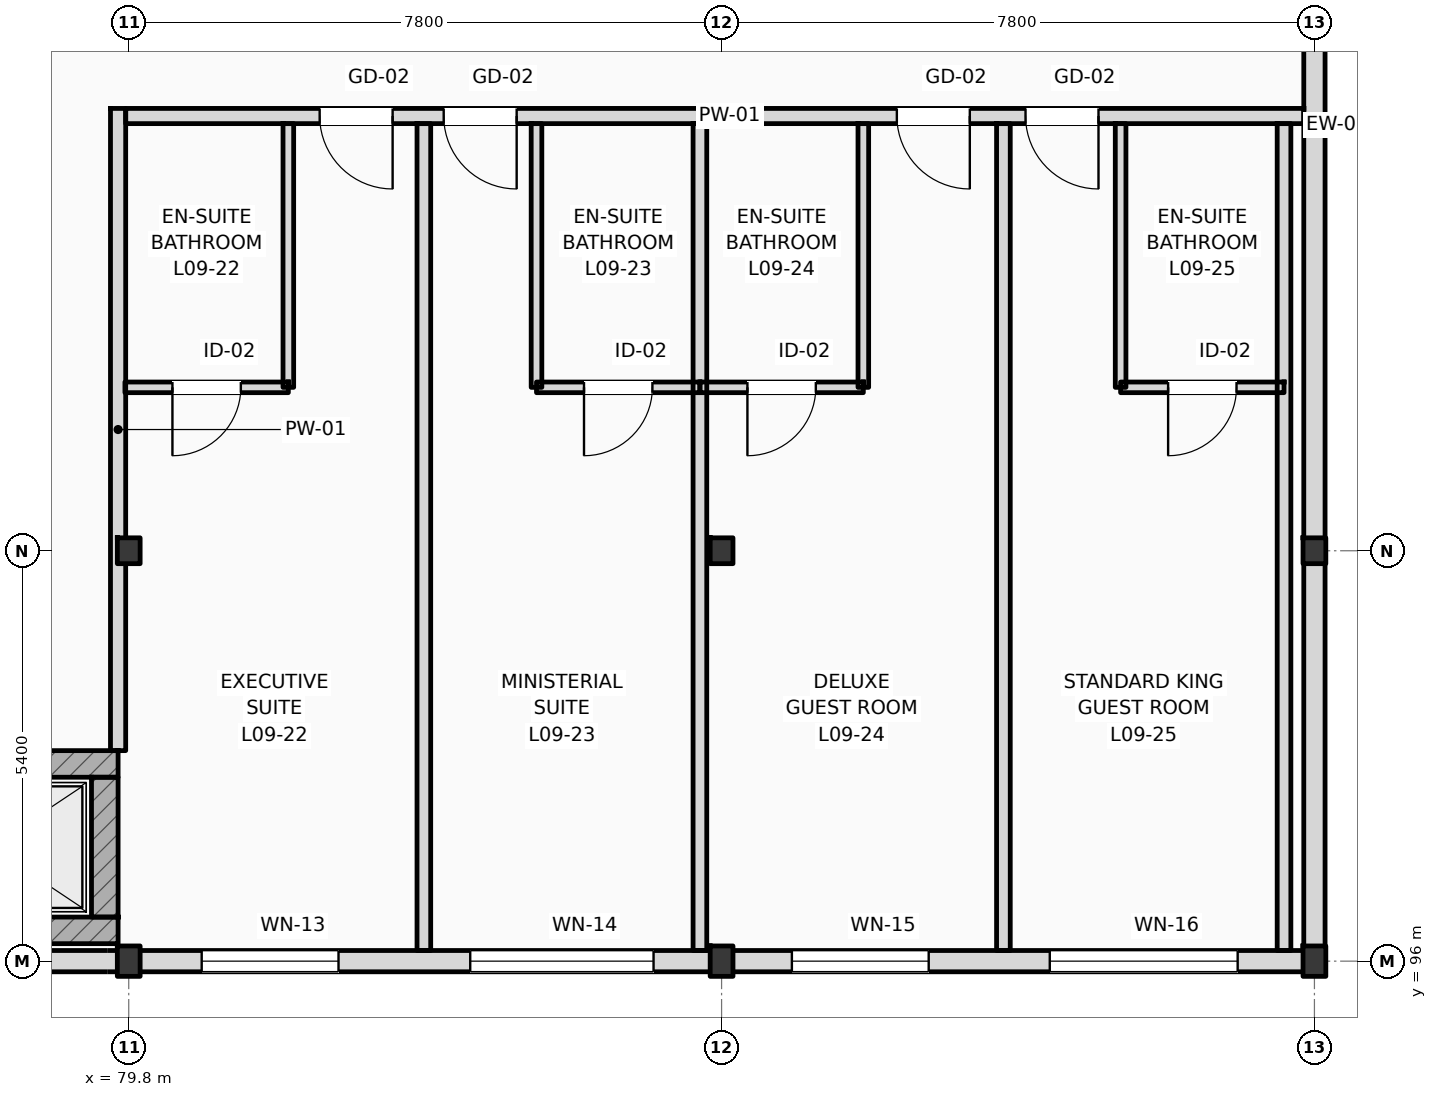
"""IFC4 building model, lengths in metres.
Left out: names, types, materials, properties, quantities, classifications, styles, units other than length and angle.
Written with IfcOpenShell. Run it as: python <this file> out.ifc"""

import sys

from ifc_helpers import new_model, si_unit, direction, frame, frame_2d, origin, origin_2d, place, context, subcontext, project, spatial, rectangle, i_section, extrude, element, fill, save


model = new_model("IFC4")
c1 = context("Model", 3, precision=1e-05, world=origin(), true_north=direction((0.0, 1.0)))
c2 = subcontext(c1, "Body", "Model", "MODEL_VIEW")
j1 = project(units=[si_unit("LENGTHUNIT", "METRE"), si_unit("PLANEANGLEUNIT", "RADIAN")], contexts=[c1])
p1 = place(None, origin())
s1 = spatial("IfcSite", under=j1, at=p1, CompositionType="ELEMENT")
p2 = place(p1, origin())
s2 = spatial("IfcBuilding", under=s1, at=p2, CompositionType="ELEMENT")
p3 = place(p2, frame((0.0, 0.0, 39.0)))
s3 = spatial("IfcBuildingStorey", under=s2, at=p3, CompositionType="ELEMENT", Elevation=39.0)
p4 = place(p3, frame((79.8, 96.0, 0.0), z_axis=(0.0, 0.0, 1.0), x_axis=(1.0, 0.0, 0.0)))
e1 = element("IfcColumn", 1, at=p4, inside=s3, PredefinedType="COLUMN", context=c2, shape_type="SweptSolid", body=[
    extrude(i_section(OverallWidth=0.3, OverallDepth=0.4, WebThickness=0.013, FlangeThickness=0.024, FilletRadius=0.027, at=origin_2d()), origin(), (0.0, 0.0, 1.0), 3.6),
])
p5 = place(p3, frame((79.8, 101.4, 0.0), z_axis=(0.0, 0.0, 1.0), x_axis=(1.0, 0.0, 0.0)))
e2 = element("IfcColumn", 2, at=p5, inside=s3, PredefinedType="COLUMN", context=c2, shape_type="SweptSolid", body=[
    extrude(i_section(OverallWidth=0.3, OverallDepth=0.34, WebThickness=0.012, FlangeThickness=0.021, FilletRadius=0.027, at=origin_2d()), origin(), (0.0, 0.0, 1.0), 3.6),
])
p6 = place(p3, frame((87.6, 96.0, 0.0), z_axis=(0.0, 0.0, 1.0), x_axis=(1.0, 0.0, 0.0)))
e3 = element("IfcColumn", 3, at=p6, inside=s3, PredefinedType="COLUMN", context=c2, shape_type="SweptSolid", body=[
    extrude(i_section(OverallWidth=0.3, OverallDepth=0.4, WebThickness=0.013, FlangeThickness=0.024, FilletRadius=0.027, at=origin_2d()), origin(), (0.0, 0.0, 1.0), 3.6),
])
p7 = place(p3, frame((87.6, 101.4, 0.0), z_axis=(0.0, 0.0, 1.0), x_axis=(1.0, 0.0, 0.0)))
e4 = element("IfcColumn", 4, at=p7, inside=s3, PredefinedType="COLUMN", context=c2, shape_type="SweptSolid", body=[
    extrude(i_section(OverallWidth=0.3, OverallDepth=0.34, WebThickness=0.012, FlangeThickness=0.021, FilletRadius=0.027, at=origin_2d()), origin(), (0.0, 0.0, 1.0), 3.6),
])
p8 = place(p3, frame((95.4, 96.0, 0.0), z_axis=(0.0, 0.0, 1.0), x_axis=(1.0, 0.0, 0.0)))
e5 = element("IfcColumn", 5, at=p8, inside=s3, PredefinedType="COLUMN", context=c2, shape_type="SweptSolid", body=[
    extrude(i_section(OverallWidth=0.3, OverallDepth=0.4, WebThickness=0.013, FlangeThickness=0.024, FilletRadius=0.027, at=origin_2d()), origin(), (0.0, 0.0, 1.0), 3.6),
])
p9 = place(p3, frame((95.4, 101.4, 0.0), z_axis=(0.0, 0.0, 1.0), x_axis=(1.0, 0.0, 0.0)))
e6 = element("IfcColumn", 6, at=p9, inside=s3, PredefinedType="COLUMN", context=c2, shape_type="SweptSolid", body=[
    extrude(i_section(OverallWidth=0.3, OverallDepth=0.34, WebThickness=0.012, FlangeThickness=0.021, FilletRadius=0.027, at=origin_2d()), origin(), (0.0, 0.0, 1.0), 3.6),
])
p10 = place(p3, frame((95.4, 96.0, 0.0), z_axis=(0.0, 0.0, 1.0), x_axis=(0.0, 1.0, 0.0)))
e7 = element("IfcWall", 7, at=p10, inside=s3, PredefinedType="STANDARD", context=c2, shape_type="SweptSolid", body=[
    extrude(rectangle(XDim=22.0, YDim=0.28, at=frame_2d((11.0, 0.0))), origin(), (0.0, 0.0, 1.0), 3.01),
])
p11 = place(p3, frame((25.2, 96.0, 0.0), z_axis=(0.0, 0.0, 1.0), x_axis=(1.0, 0.0, 0.0)))
e8 = element("IfcWall", 8, at=p11, inside=s3, PredefinedType="STANDARD", context=c2, shape_type="SweptSolid", body=[
    extrude(rectangle(XDim=70.2, YDim=0.28, at=frame_2d((35.1, 0.0))), origin(), (0.0, 0.0, 1.0), 2.92),
])
p12 = place(p11, frame((16.695, 0.0, 0.9)))
e9 = element("IfcOpeningElement", 9, at=p12, cuts=e8, PredefinedType="OPENING", context=c2, shape_type="SweptSolid", body=[
    extrude(rectangle(XDim=2.25, YDim=1.84, at=frame_2d((1.125, 0.92))), frame((0.0, 0.15, 0.0), z_axis=(0.0, -1.0, 0.0), x_axis=(1.0, 0.0, 0.0)), (0.0, 0.0, 1.0), 0.3),
])
p13 = place(p11, frame((20.748, 0.0, 0.9)))
e10 = element("IfcOpeningElement", 10, at=p13, cuts=e8, PredefinedType="OPENING", context=c2, shape_type="SweptSolid", body=[
    extrude(rectangle(XDim=1.8, YDim=1.84, at=frame_2d((0.9, 0.92))), frame((0.0, 0.15, 0.0), z_axis=(0.0, -1.0, 0.0), x_axis=(1.0, 0.0, 0.0)), (0.0, 0.0, 1.0), 0.3),
])
p14 = place(p11, frame((25.963, 0.0, 0.9)))
e11 = element("IfcOpeningElement", 11, at=p14, cuts=e8, PredefinedType="OPENING", context=c2, shape_type="SweptSolid", body=[
    extrude(rectangle(XDim=2.55, YDim=1.84, at=frame_2d((1.275, 0.92))), frame((0.0, 0.15, 0.0), z_axis=(0.0, -1.0, 0.0), x_axis=(1.0, 0.0, 0.0)), (0.0, 0.0, 1.0), 0.3),
])
p15 = place(p11, frame((32.177, 0.0, 0.9)))
e12 = element("IfcOpeningElement", 12, at=p15, cuts=e8, PredefinedType="OPENING", context=c2, shape_type="SweptSolid", body=[
    extrude(rectangle(XDim=1.35, YDim=1.84, at=frame_2d((0.675, 0.92))), frame((0.0, 0.15, 0.0), z_axis=(0.0, -1.0, 0.0), x_axis=(1.0, 0.0, 0.0)), (0.0, 0.0, 1.0), 0.3),
])
p16 = place(p11, frame((35.267, 0.0, 0.9)))
e13 = element("IfcOpeningElement", 13, at=p16, cuts=e8, PredefinedType="OPENING", context=c2, shape_type="SweptSolid", body=[
    extrude(rectangle(XDim=2.85, YDim=1.84, at=frame_2d((1.425, 0.92))), frame((0.0, 0.15, 0.0), z_axis=(0.0, -1.0, 0.0), x_axis=(1.0, 0.0, 0.0)), (0.0, 0.0, 1.0), 0.3),
])
p17 = place(p11, frame((55.56, 0.0, 0.9)))
e14 = element("IfcOpeningElement", 14, at=p17, cuts=e8, PredefinedType="OPENING", context=c2, shape_type="SweptSolid", body=[
    extrude(rectangle(XDim=1.8, YDim=1.84, at=frame_2d((0.9, 0.92))), frame((0.0, 0.15, 0.0), z_axis=(0.0, -1.0, 0.0), x_axis=(1.0, 0.0, 0.0)), (0.0, 0.0, 1.0), 0.3),
])
p18 = place(p11, frame((59.093, 0.0, 0.9)))
e15 = element("IfcOpeningElement", 15, at=p18, cuts=e8, PredefinedType="OPENING", context=c2, shape_type="SweptSolid", body=[
    extrude(rectangle(XDim=2.412, YDim=1.84, at=frame_2d((1.206, 0.92))), frame((0.0, 0.15, 0.0), z_axis=(0.0, -1.0, 0.0), x_axis=(1.0, 0.0, 0.0)), (0.0, 0.0, 1.0), 0.3),
])
p19 = place(p11, frame((63.325, 0.0, 0.9)))
e16 = element("IfcOpeningElement", 16, at=p19, cuts=e8, PredefinedType="OPENING", context=c2, shape_type="SweptSolid", body=[
    extrude(rectangle(XDim=1.8, YDim=1.84, at=frame_2d((0.9, 0.92))), frame((0.0, 0.15, 0.0), z_axis=(0.0, -1.0, 0.0), x_axis=(1.0, 0.0, 0.0)), (0.0, 0.0, 1.0), 0.3),
])
p20 = place(p11, frame((66.718, 0.0, 0.9)))
e17 = element("IfcOpeningElement", 17, at=p20, cuts=e8, PredefinedType="OPENING", context=c2, shape_type="SweptSolid", body=[
    extrude(rectangle(XDim=2.472, YDim=1.84, at=frame_2d((1.236, 0.92))), frame((0.0, 0.15, 0.0), z_axis=(0.0, -1.0, 0.0), x_axis=(1.0, 0.0, 0.0)), (0.0, 0.0, 1.0), 0.3),
])
p21 = place(p3, frame((76.67, 98.595, 0.0), z_axis=(0.0, 0.0, 1.0), x_axis=(1.0, 0.0, 0.0)))
e18 = element("IfcWall", 18, at=p21, inside=s3, PredefinedType="SHEAR", context=c2, shape_type="SweptSolid", body=[
    extrude(rectangle(XDim=2.99, YDim=0.35, at=frame_2d((1.495, 0.0))), origin(), (0.0, 0.0, 1.0), 3.38),
])
p22 = place(p21, frame((0.695, 0.0, 0.0)))
e19 = element("IfcOpeningElement", 19, at=p22, cuts=e18, PredefinedType="OPENING", context=c2, shape_type="SweptSolid", body=[
    extrude(rectangle(XDim=1.25, YDim=2.25, at=frame_2d((0.625, 1.125))), frame((0.0, 0.185, 0.0), z_axis=(0.0, -1.0, 0.0), x_axis=(1.0, 0.0, 0.0)), (0.0, 0.0, 1.0), 0.37),
])
p23 = place(p3, frame((76.67, 96.405, 0.0), z_axis=(0.0, 0.0, 1.0), x_axis=(1.0, 0.0, 0.0)))
e20 = element("IfcWall", 20, at=p23, inside=s3, PredefinedType="SHEAR", context=c2, shape_type="SweptSolid", body=[
    extrude(rectangle(XDim=2.99, YDim=0.35, at=frame_2d((1.495, 0.0))), origin(), (0.0, 0.0, 1.0), 3.38),
])
p24 = place(p3, frame((79.485, 96.58, 0.0), z_axis=(0.0, 0.0, 1.0), x_axis=(0.0, 1.0, 0.0)))
e21 = element("IfcWall", 21, at=p24, inside=s3, PredefinedType="SHEAR", context=c2, shape_type="SweptSolid", body=[
    extrude(rectangle(XDim=1.84, YDim=0.35, at=frame_2d((0.92, 0.0))), origin(), (0.0, 0.0, 1.0), 3.01),
])
p25 = place(p3, frame((79.76, 107.12, 0.0), z_axis=(0.0, 0.0, 1.0), x_axis=(1.0, 0.0, 0.0)))
e22 = element("IfcWall", 22, at=p25, inside=s3, PredefinedType="PARTITIONING", context=c2, shape_type="SweptSolid", body=[
    extrude(rectangle(XDim=15.5, YDim=0.2, at=frame_2d((7.75, 0.0))), origin(), (0.0, 0.0, 1.0), 3.38),
])
p26 = place(p25, frame((2.552, 0.0, 0.0)))
e23 = element("IfcOpeningElement", 23, at=p26, cuts=e22, PredefinedType="OPENING", context=c2, shape_type="SweptSolid", body=[
    extrude(rectangle(XDim=0.96, YDim=2.2, at=frame_2d((0.48, 1.1))), frame((0.0, 0.11, 0.0), z_axis=(0.0, -1.0, 0.0), x_axis=(1.0, 0.0, 0.0)), (0.0, 0.0, 1.0), 0.22),
])
p27 = place(p25, frame((4.184, 0.0, 0.0)))
e24 = element("IfcOpeningElement", 24, at=p27, cuts=e22, PredefinedType="OPENING", context=c2, shape_type="SweptSolid", body=[
    extrude(rectangle(XDim=0.96, YDim=2.2, at=frame_2d((0.48, 1.1))), frame((0.0, 0.11, 0.0), z_axis=(0.0, -1.0, 0.0), x_axis=(1.0, 0.0, 0.0)), (0.0, 0.0, 1.0), 0.22),
])
p28 = place(p25, frame((10.146, 0.0, 0.0)))
e25 = element("IfcOpeningElement", 25, at=p28, cuts=e22, PredefinedType="OPENING", context=c2, shape_type="SweptSolid", body=[
    extrude(rectangle(XDim=0.96, YDim=2.2, at=frame_2d((0.48, 1.1))), frame((0.0, 0.11, 0.0), z_axis=(0.0, -1.0, 0.0), x_axis=(1.0, 0.0, 0.0)), (0.0, 0.0, 1.0), 0.22),
])
p29 = place(p25, frame((11.839, 0.0, 0.0)))
e26 = element("IfcOpeningElement", 26, at=p29, cuts=e22, PredefinedType="OPENING", context=c2, shape_type="SweptSolid", body=[
    extrude(rectangle(XDim=0.96, YDim=2.2, at=frame_2d((0.48, 1.1))), frame((0.0, 0.11, 0.0), z_axis=(0.0, -1.0, 0.0), x_axis=(1.0, 0.0, 0.0)), (0.0, 0.0, 1.0), 0.22),
])
p30 = place(p3, frame((79.66, 98.77, 0.0), z_axis=(0.0, 0.0, 1.0), x_axis=(0.0, 1.0, 0.0)))
e27 = element("IfcWall", 27, at=p30, inside=s3, PredefinedType="PARTITIONING", context=c2, shape_type="SweptSolid", body=[
    extrude(rectangle(XDim=8.45, YDim=0.2, at=frame_2d((4.225, 0.0))), origin(), (0.0, 0.0, 1.0), 3.01),
])
p31 = place(p3, frame((83.683, 96.14, 0.0), z_axis=(0.0, 0.0, 1.0), x_axis=(0.0, 1.0, 0.0)))
e28 = element("IfcWall", 28, at=p31, inside=s3, PredefinedType="PARTITIONING", context=c2, shape_type="SweptSolid", body=[
    extrude(rectangle(XDim=10.88, YDim=0.18, at=frame_2d((5.44, 0.0))), origin(), (0.0, 0.0, 1.0), 3.38),
])
p32 = place(p3, frame((81.9, 103.55, 0.0), z_axis=(0.0, 0.0, 1.0), x_axis=(0.0, 1.0, 0.0)))
e29 = element("IfcWall", 29, at=p32, inside=s3, PredefinedType="PARTITIONING", context=c2, shape_type="SweptSolid", body=[
    extrude(rectangle(XDim=3.47, YDim=0.14, at=frame_2d((1.735, 0.0))), origin(), (0.0, 0.0, 1.0), 3.38),
])
p33 = place(p3, frame((79.75, 103.55, 0.0), z_axis=(0.0, 0.0, 1.0), x_axis=(1.0, 0.0, 0.0)))
e30 = element("IfcWall", 30, at=p33, inside=s3, PredefinedType="PARTITIONING", context=c2, shape_type="SweptSolid", body=[
    extrude(rectangle(XDim=2.15, YDim=0.14, at=frame_2d((1.075, 0.0))), origin(), (0.0, 0.0, 1.0), 3.38),
])
p34 = place(p33, frame((0.625, 0.0, 0.0)))
e31 = element("IfcOpeningElement", 31, at=p34, cuts=e30, PredefinedType="OPENING", context=c2, shape_type="SweptSolid", body=[
    extrude(rectangle(XDim=0.9, YDim=2.1, at=frame_2d((0.45, 1.05))), frame((0.0, 0.08, 0.0), z_axis=(0.0, -1.0, 0.0), x_axis=(1.0, 0.0, 0.0)), (0.0, 0.0, 1.0), 0.16),
])
p35 = place(p3, frame((87.315, 96.14, 0.0), z_axis=(0.0, 0.0, 1.0), x_axis=(0.0, 1.0, 0.0)))
e32 = element("IfcWall", 32, at=p35, inside=s3, PredefinedType="PARTITIONING", context=c2, shape_type="SweptSolid", body=[
    extrude(rectangle(XDim=10.88, YDim=0.18, at=frame_2d((5.44, 0.0))), origin(), (0.0, 0.0, 1.0), 3.38),
])
p36 = place(p3, frame((85.165, 103.55, 0.0), z_axis=(0.0, 0.0, 1.0), x_axis=(0.0, 1.0, 0.0)))
e33 = element("IfcWall", 33, at=p36, inside=s3, PredefinedType="PARTITIONING", context=c2, shape_type="SweptSolid", body=[
    extrude(rectangle(XDim=3.47, YDim=0.14, at=frame_2d((1.735, 0.0))), origin(), (0.0, 0.0, 1.0), 3.07),
])
p37 = place(p3, frame((85.165, 103.55, 0.0), z_axis=(0.0, 0.0, 1.0), x_axis=(1.0, 0.0, 0.0)))
e34 = element("IfcWall", 34, at=p37, inside=s3, PredefinedType="PARTITIONING", context=c2, shape_type="SweptSolid", body=[
    extrude(rectangle(XDim=2.15, YDim=0.14, at=frame_2d((1.075, 0.0))), origin(), (0.0, 0.0, 1.0), 3.38),
])
p38 = place(p37, frame((0.625, 0.0, 0.0)))
e35 = element("IfcOpeningElement", 35, at=p38, cuts=e34, PredefinedType="OPENING", context=c2, shape_type="SweptSolid", body=[
    extrude(rectangle(XDim=0.9, YDim=2.1, at=frame_2d((0.45, 1.05))), frame((0.0, 0.08, 0.0), z_axis=(0.0, -1.0, 0.0), x_axis=(1.0, 0.0, 0.0)), (0.0, 0.0, 1.0), 0.16),
])
p39 = place(p3, frame((91.308, 96.14, 0.0), z_axis=(0.0, 0.0, 1.0), x_axis=(0.0, 1.0, 0.0)))
e36 = element("IfcWall", 36, at=p39, inside=s3, PredefinedType="PARTITIONING", context=c2, shape_type="SweptSolid", body=[
    extrude(rectangle(XDim=10.88, YDim=0.18, at=frame_2d((5.44, 0.0))), origin(), (0.0, 0.0, 1.0), 3.38),
])
p40 = place(p3, frame((89.465, 103.55, 0.0), z_axis=(0.0, 0.0, 1.0), x_axis=(0.0, 1.0, 0.0)))
e37 = element("IfcWall", 37, at=p40, inside=s3, PredefinedType="PARTITIONING", context=c2, shape_type="SweptSolid", body=[
    extrude(rectangle(XDim=3.47, YDim=0.14, at=frame_2d((1.735, 0.0))), origin(), (0.0, 0.0, 1.0), 3.38),
])
p41 = place(p3, frame((87.315, 103.55, 0.0), z_axis=(0.0, 0.0, 1.0), x_axis=(1.0, 0.0, 0.0)))
e38 = element("IfcWall", 38, at=p41, inside=s3, PredefinedType="PARTITIONING", context=c2, shape_type="SweptSolid", body=[
    extrude(rectangle(XDim=2.15, YDim=0.14, at=frame_2d((1.075, 0.0))), origin(), (0.0, 0.0, 1.0), 3.38),
])
p42 = place(p41, frame((0.625, 0.0, 0.0)))
e39 = element("IfcOpeningElement", 39, at=p42, cuts=e38, PredefinedType="OPENING", context=c2, shape_type="SweptSolid", body=[
    extrude(rectangle(XDim=0.9, YDim=2.1, at=frame_2d((0.45, 1.05))), frame((0.0, 0.08, 0.0), z_axis=(0.0, -1.0, 0.0), x_axis=(1.0, 0.0, 0.0)), (0.0, 0.0, 1.0), 0.16),
])
p43 = place(p3, frame((95.0, 96.14, 0.0), z_axis=(0.0, 0.0, 1.0), x_axis=(0.0, 1.0, 0.0)))
e40 = element("IfcWall", 40, at=p43, inside=s3, PredefinedType="PARTITIONING", context=c2, shape_type="SweptSolid", body=[
    extrude(rectangle(XDim=10.88, YDim=0.18, at=frame_2d((5.44, 0.0))), origin(), (0.0, 0.0, 1.0), 3.38),
])
p44 = place(p3, frame((92.85, 103.55, 0.0), z_axis=(0.0, 0.0, 1.0), x_axis=(0.0, 1.0, 0.0)))
e41 = element("IfcWall", 41, at=p44, inside=s3, PredefinedType="PARTITIONING", context=c2, shape_type="SweptSolid", body=[
    extrude(rectangle(XDim=3.47, YDim=0.14, at=frame_2d((1.735, 0.0))), origin(), (0.0, 0.0, 1.0), 3.07),
])
p45 = place(p3, frame((92.85, 103.55, 0.0), z_axis=(0.0, 0.0, 1.0), x_axis=(1.0, 0.0, 0.0)))
e42 = element("IfcWall", 42, at=p45, inside=s3, PredefinedType="PARTITIONING", context=c2, shape_type="SweptSolid", body=[
    extrude(rectangle(XDim=2.15, YDim=0.14, at=frame_2d((1.075, 0.0))), origin(), (0.0, 0.0, 1.0), 3.38),
])
p46 = place(p45, frame((0.625, 0.0, 0.0)))
e43 = element("IfcOpeningElement", 43, at=p46, cuts=e42, PredefinedType="OPENING", context=c2, shape_type="SweptSolid", body=[
    extrude(rectangle(XDim=0.9, YDim=2.1, at=frame_2d((0.45, 1.05))), frame((0.0, 0.08, 0.0), z_axis=(0.0, -1.0, 0.0), x_axis=(1.0, 0.0, 0.0)), (0.0, 0.0, 1.0), 0.16),
])
p47 = place(p17, origin())
e44 = element("IfcWindow", 44, at=p47, inside=s3, PartitioningType="DOUBLE_PANEL_VERTICAL", PredefinedType="WINDOW", context=c2, shape_type="SweptSolid", body=[
    extrude(rectangle(XDim=1.8, YDim=1.84, at=frame_2d((0.9, 0.92))), frame((0.0, 0.03, 0.0), z_axis=(0.0, -1.0, 0.0), x_axis=(1.0, 0.0, 0.0)), (0.0, 0.0, 1.0), 0.06),
])
fill(e14, e44)
p48 = place(p18, origin())
e45 = element("IfcWindow", 45, at=p48, inside=s3, PartitioningType="DOUBLE_PANEL_VERTICAL", PredefinedType="WINDOW", context=c2, shape_type="SweptSolid", body=[
    extrude(rectangle(XDim=2.412, YDim=1.84, at=frame_2d((1.206, 0.92))), frame((0.0, 0.03, 0.0), z_axis=(0.0, -1.0, 0.0), x_axis=(1.0, 0.0, 0.0)), (0.0, 0.0, 1.0), 0.06),
])
fill(e15, e45)
p49 = place(p19, origin())
e46 = element("IfcWindow", 46, at=p49, inside=s3, PartitioningType="DOUBLE_PANEL_VERTICAL", PredefinedType="WINDOW", context=c2, shape_type="SweptSolid", body=[
    extrude(rectangle(XDim=1.8, YDim=1.84, at=frame_2d((0.9, 0.92))), frame((0.0, 0.03, 0.0), z_axis=(0.0, -1.0, 0.0), x_axis=(1.0, 0.0, 0.0)), (0.0, 0.0, 1.0), 0.06),
])
fill(e16, e46)
p50 = place(p20, origin())
e47 = element("IfcWindow", 47, at=p50, inside=s3, PartitioningType="DOUBLE_PANEL_VERTICAL", PredefinedType="WINDOW", context=c2, shape_type="SweptSolid", body=[
    extrude(rectangle(XDim=2.472, YDim=1.84, at=frame_2d((1.236, 0.92))), frame((0.0, 0.03, 0.0), z_axis=(0.0, -1.0, 0.0), x_axis=(1.0, 0.0, 0.0)), (0.0, 0.0, 1.0), 0.06),
])
fill(e17, e47)
p51 = place(p26, frame((0.96, 0.0, 0.0), z_axis=(0.0, 0.0, 1.0), x_axis=(-1.0, 0.0, 0.0)))
e48 = element("IfcDoor", 48, at=p51, inside=s3, OperationType="SINGLE_SWING_RIGHT", PredefinedType="DOOR", context=c2, shape_type="SweptSolid", body=[
    extrude(rectangle(XDim=0.96, YDim=2.2, at=frame_2d((0.48, 1.1))), frame((0.0, 0.025, 0.0), z_axis=(0.0, -1.0, 0.0), x_axis=(1.0, 0.0, 0.0)), (0.0, 0.0, 1.0), 0.05),
])
fill(e23, e48)
p52 = place(p34, frame((0.9, 0.0, 0.0), z_axis=(0.0, 0.0, 1.0), x_axis=(-1.0, 0.0, 0.0)))
e49 = element("IfcDoor", 49, at=p52, inside=s3, OperationType="SINGLE_SWING_LEFT", PredefinedType="DOOR", context=c2, shape_type="SweptSolid", body=[
    extrude(rectangle(XDim=0.9, YDim=2.1, at=frame_2d((0.45, 1.05))), frame((0.0, 0.025, 0.0), z_axis=(0.0, -1.0, 0.0), x_axis=(1.0, 0.0, 0.0)), (0.0, 0.0, 1.0), 0.05),
])
fill(e31, e49)
p53 = place(p27, frame((0.96, 0.0, 0.0), z_axis=(0.0, 0.0, 1.0), x_axis=(-1.0, 0.0, 0.0)))
e50 = element("IfcDoor", 50, at=p53, inside=s3, OperationType="SINGLE_SWING_RIGHT", PredefinedType="DOOR", context=c2, shape_type="SweptSolid", body=[
    extrude(rectangle(XDim=0.96, YDim=2.2, at=frame_2d((0.48, 1.1))), frame((0.0, 0.025, 0.0), z_axis=(0.0, -1.0, 0.0), x_axis=(1.0, 0.0, 0.0)), (0.0, 0.0, 1.0), 0.05),
])
fill(e24, e50)
p54 = place(p38, frame((0.9, 0.0, 0.0), z_axis=(0.0, 0.0, 1.0), x_axis=(-1.0, 0.0, 0.0)))
e51 = element("IfcDoor", 51, at=p54, inside=s3, OperationType="SINGLE_SWING_LEFT", PredefinedType="DOOR", context=c2, shape_type="SweptSolid", body=[
    extrude(rectangle(XDim=0.9, YDim=2.1, at=frame_2d((0.45, 1.05))), frame((0.0, 0.025, 0.0), z_axis=(0.0, -1.0, 0.0), x_axis=(1.0, 0.0, 0.0)), (0.0, 0.0, 1.0), 0.05),
])
fill(e35, e51)
p55 = place(p28, frame((0.96, 0.0, 0.0), z_axis=(0.0, 0.0, 1.0), x_axis=(-1.0, 0.0, 0.0)))
e52 = element("IfcDoor", 52, at=p55, inside=s3, OperationType="SINGLE_SWING_RIGHT", PredefinedType="DOOR", context=c2, shape_type="SweptSolid", body=[
    extrude(rectangle(XDim=0.96, YDim=2.2, at=frame_2d((0.48, 1.1))), frame((0.0, 0.025, 0.0), z_axis=(0.0, -1.0, 0.0), x_axis=(1.0, 0.0, 0.0)), (0.0, 0.0, 1.0), 0.05),
])
fill(e25, e52)
p56 = place(p42, frame((0.9, 0.0, 0.0), z_axis=(0.0, 0.0, 1.0), x_axis=(-1.0, 0.0, 0.0)))
e53 = element("IfcDoor", 53, at=p56, inside=s3, OperationType="SINGLE_SWING_LEFT", PredefinedType="DOOR", context=c2, shape_type="SweptSolid", body=[
    extrude(rectangle(XDim=0.9, YDim=2.1, at=frame_2d((0.45, 1.05))), frame((0.0, 0.025, 0.0), z_axis=(0.0, -1.0, 0.0), x_axis=(1.0, 0.0, 0.0)), (0.0, 0.0, 1.0), 0.05),
])
fill(e39, e53)
p57 = place(p29, frame((0.96, 0.0, 0.0), z_axis=(0.0, 0.0, 1.0), x_axis=(-1.0, 0.0, 0.0)))
e54 = element("IfcDoor", 54, at=p57, inside=s3, OperationType="SINGLE_SWING_RIGHT", PredefinedType="DOOR", context=c2, shape_type="SweptSolid", body=[
    extrude(rectangle(XDim=0.96, YDim=2.2, at=frame_2d((0.48, 1.1))), frame((0.0, 0.025, 0.0), z_axis=(0.0, -1.0, 0.0), x_axis=(1.0, 0.0, 0.0)), (0.0, 0.0, 1.0), 0.05),
])
fill(e26, e54)
p58 = place(p46, frame((0.9, 0.0, 0.0), z_axis=(0.0, 0.0, 1.0), x_axis=(-1.0, 0.0, 0.0)))
e55 = element("IfcDoor", 55, at=p58, inside=s3, OperationType="SINGLE_SWING_LEFT", PredefinedType="DOOR", context=c2, shape_type="SweptSolid", body=[
    extrude(rectangle(XDim=0.9, YDim=2.1, at=frame_2d((0.45, 1.05))), frame((0.0, 0.025, 0.0), z_axis=(0.0, -1.0, 0.0), x_axis=(1.0, 0.0, 0.0)), (0.0, 0.0, 1.0), 0.05),
])
fill(e43, e55)
save(model, sys.argv[1])
